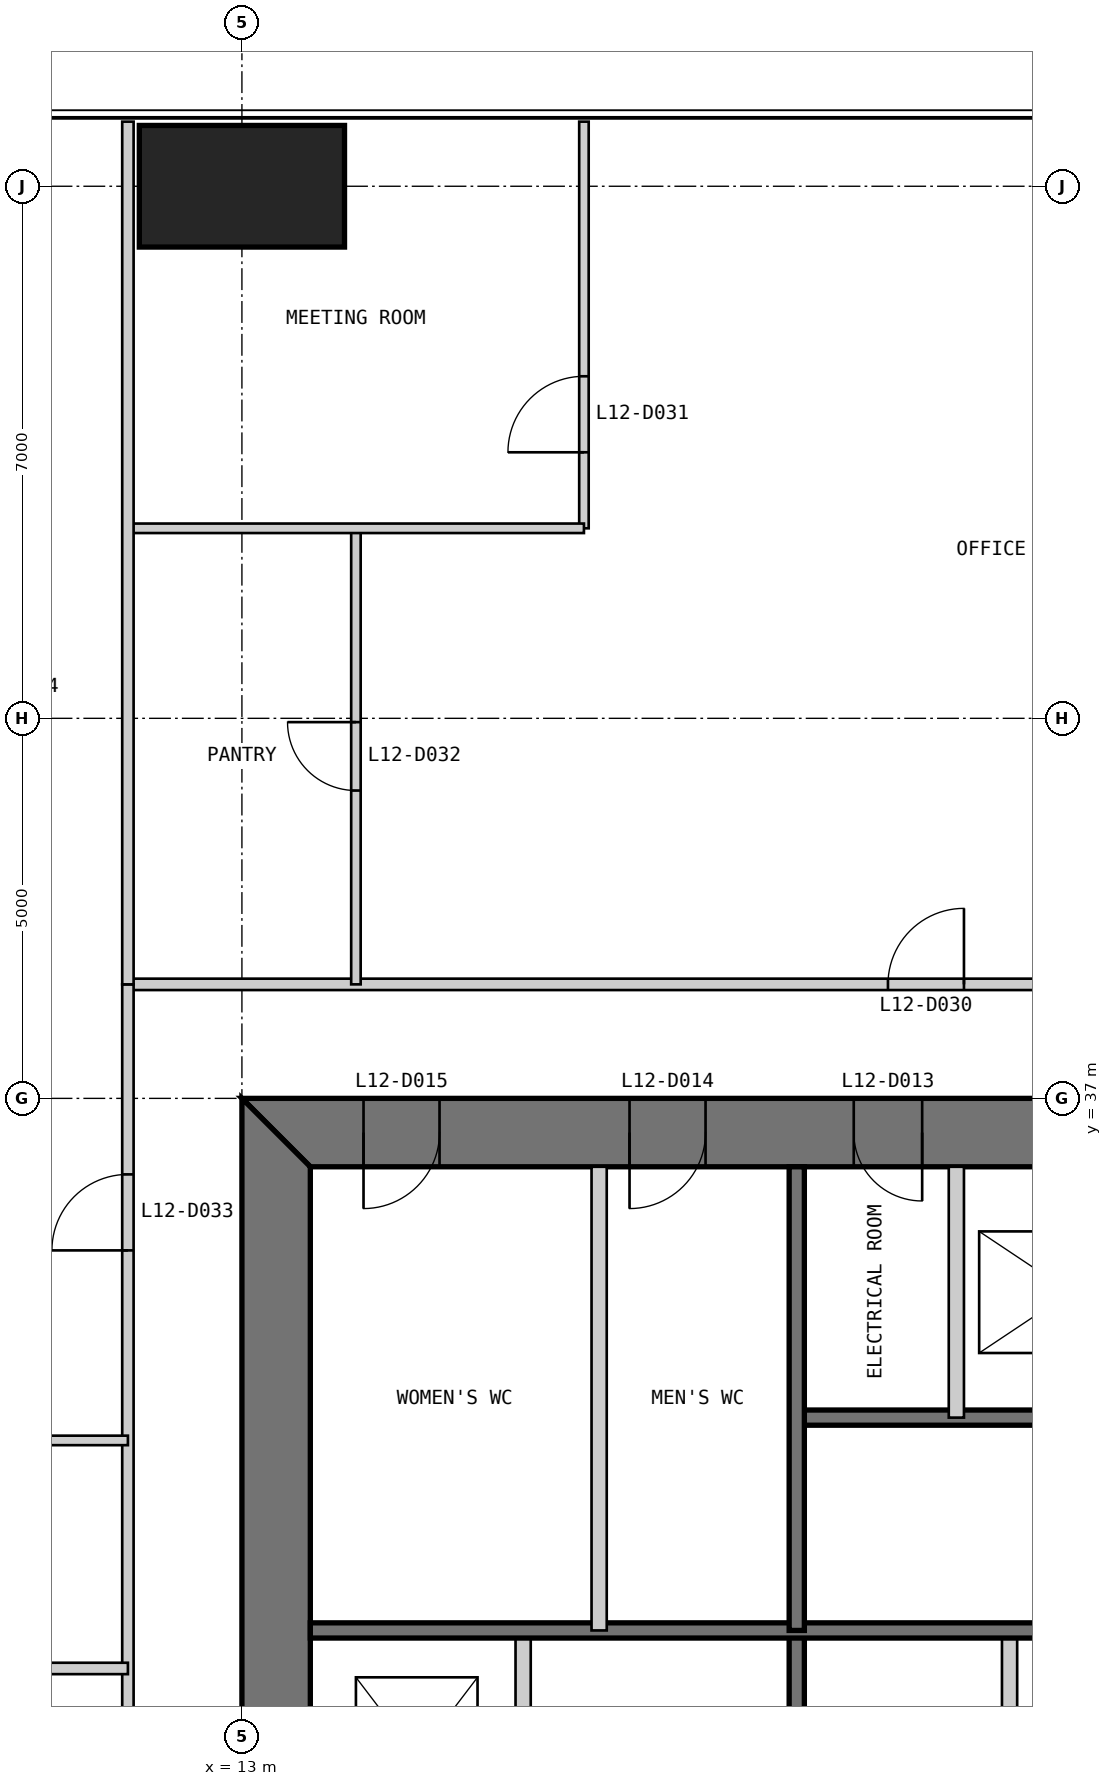
"""IFC4 building model, lengths in metres.
Left out: names, types, materials, properties, quantities, classifications, styles, units other than length and angle.
Written with IfcOpenShell. Run it as: python <this file> out.ifc"""

import sys

from ifc_helpers import new_model, si_unit, direction, frame, frame_2d, origin, origin_2d, place, context, subcontext, project, spatial, polyline, rectangle, outline, extrude, element, fill, save


model = new_model("IFC4")
c1 = context("Model", 3, precision=1e-05, world=origin(), true_north=direction((0.0, 1.0)))
c2 = subcontext(c1, "Body", "Model", "MODEL_VIEW")
j1 = project(units=[si_unit("LENGTHUNIT", "METRE"), si_unit("PLANEANGLEUNIT", "RADIAN")], contexts=[c1])
p1 = place(None, origin())
s1 = spatial("IfcSite", under=j1, at=p1, CompositionType="ELEMENT")
p2 = place(p1, origin())
s2 = spatial("IfcBuilding", under=s1, at=p2, CompositionType="ELEMENT")
p3 = place(p2, frame((0.0, 0.0, 55.0)))
s3 = spatial("IfcBuildingStorey", under=s2, at=p3, CompositionType="ELEMENT", Elevation=55.0)
p4 = place(p3, frame((13.0, 49.0, 0.0), z_axis=(0.0, 0.0, 1.0), x_axis=(1.0, 0.0, 0.0)))
e1 = element("IfcColumn", 1, at=p4, inside=s3, PredefinedType="COLUMN", context=c2, shape_type="SweptSolid", body=[
    extrude(rectangle(XDim=2.7, YDim=1.6, at=origin_2d()), origin(), (0.0, 0.0, 1.0), 4.0),
])
p5 = place(p3, frame((37.0, 36.55, 0.0), z_axis=(0.0, 0.0, 1.0), x_axis=(-1.0, 0.0, 0.0)))
e2 = element("IfcWall", 2, at=p5, inside=s3, PredefinedType="SHEAR", context=c2, shape_type="SweptSolid", body=[
    extrude(outline(polyline([(0.0, -0.45), (24.0, -0.45), (23.1, 0.45), (0.9, 0.45), (0.0, -0.45)])), origin(), (0.0, 0.0, 1.0), 4.0),
])
p6 = place(p5, frame((4.9, 0.0, 0.0)))
e3 = element("IfcOpeningElement", 3, at=p6, cuts=e2, PredefinedType="OPENING", context=c2, shape_type="SweptSolid", body=[
    extrude(rectangle(XDim=1.0, YDim=2.2, at=frame_2d((0.5, 1.1))), frame((0.0, 0.46, 0.0), z_axis=(0.0, -1.0, 0.0), x_axis=(1.0, 0.0, 0.0)), (0.0, 0.0, 1.0), 0.92),
])
p7 = place(p5, frame((8.9, 0.0, 0.0)))
e4 = element("IfcOpeningElement", 4, at=p7, cuts=e2, PredefinedType="OPENING", context=c2, shape_type="SweptSolid", body=[
    extrude(rectangle(XDim=1.1, YDim=2.2, at=frame_2d((0.55, 1.1))), frame((0.0, 0.46, 0.0), z_axis=(0.0, -1.0, 0.0), x_axis=(1.0, 0.0, 0.0)), (0.0, 0.0, 1.0), 0.92),
])
p8 = place(p5, frame((15.05, 0.0, 0.0)))
e5 = element("IfcOpeningElement", 5, at=p8, cuts=e2, PredefinedType="OPENING", context=c2, shape_type="SweptSolid", body=[
    extrude(rectangle(XDim=0.9, YDim=2.2, at=frame_2d((0.45, 1.1))), frame((0.0, 0.46, 0.0), z_axis=(0.0, -1.0, 0.0), x_axis=(1.0, 0.0, 0.0)), (0.0, 0.0, 1.0), 0.92),
])
p9 = place(p5, frame((17.9, 0.0, 0.0)))
e6 = element("IfcOpeningElement", 6, at=p9, cuts=e2, PredefinedType="OPENING", context=c2, shape_type="SweptSolid", body=[
    extrude(rectangle(XDim=1.0, YDim=2.2, at=frame_2d((0.5, 1.1))), frame((0.0, 0.46, 0.0), z_axis=(0.0, -1.0, 0.0), x_axis=(1.0, 0.0, 0.0)), (0.0, 0.0, 1.0), 0.92),
])
p10 = place(p5, frame((21.4, 0.0, 0.0)))
e7 = element("IfcOpeningElement", 7, at=p10, cuts=e2, PredefinedType="OPENING", context=c2, shape_type="SweptSolid", body=[
    extrude(rectangle(XDim=1.0, YDim=2.2, at=frame_2d((0.5, 1.1))), frame((0.0, 0.46, 0.0), z_axis=(0.0, -1.0, 0.0), x_axis=(1.0, 0.0, 0.0)), (0.0, 0.0, 1.0), 0.92),
])
p11 = place(p3, frame((13.45, 36.1, 0.0), z_axis=(0.0, 0.0, 1.0), x_axis=(0.0, -1.0, 0.0)))
e8 = element("IfcWall", 8, at=p11, inside=s3, PredefinedType="SHEAR", context=c2, shape_type="SweptSolid", body=[
    extrude(outline(polyline([(-0.9, -0.45), (23.1, -0.45), (22.2, 0.45), (0.0, 0.45), (-0.9, -0.45)])), origin(), (0.0, 0.0, 1.0), 4.0),
])
p12 = place(p11, frame((20.2, 0.0, 0.0)))
e9 = element("IfcOpeningElement", 9, at=p12, cuts=e8, PredefinedType="OPENING", context=c2, shape_type="SweptSolid", body=[
    extrude(rectangle(XDim=1.0, YDim=2.2, at=frame_2d((0.5, 1.1))), frame((0.0, 0.46, 0.0), z_axis=(0.0, -1.0, 0.0), x_axis=(1.0, 0.0, 0.0)), (0.0, 0.0, 1.0), 0.92),
])
p13 = place(p11, frame((17.25, 0.0, 0.0)))
e10 = element("IfcOpeningElement", 10, at=p13, cuts=e8, PredefinedType="OPENING", context=c2, shape_type="SweptSolid", body=[
    extrude(rectangle(XDim=0.9, YDim=2.2, at=frame_2d((0.45, 1.1))), frame((0.0, 0.46, 0.0), z_axis=(0.0, -1.0, 0.0), x_axis=(1.0, 0.0, 0.0)), (0.0, 0.0, 1.0), 0.92),
])
p14 = place(p3, frame((16.7, 13.9, 0.0), z_axis=(0.0, 0.0, 1.0), x_axis=(0.0, 1.0, 0.0)))
e11 = element("IfcWall", 11, at=p14, inside=s3, PredefinedType="PARTITIONING", context=c2, shape_type="SweptSolid", body=[
    extrude(rectangle(XDim=16.1, YDim=0.2, at=frame_2d((8.05, 0.0))), origin(), (0.0, 0.0, 1.0), 3.8),
])
p15 = place(p14, frame((4.1, 0.0, 0.0)))
e12 = element("IfcOpeningElement", 12, at=p15, cuts=e11, PredefinedType="OPENING", context=c2, shape_type="SweptSolid", body=[
    extrude(rectangle(XDim=0.9, YDim=2.2, at=frame_2d((0.45, 1.1))), frame((0.0, 0.11, 0.0), z_axis=(0.0, -1.0, 0.0), x_axis=(1.0, 0.0, 0.0)), (0.0, 0.0, 1.0), 0.22),
])
p16 = place(p14, frame((7.217, 0.0, 0.0)))
e13 = element("IfcOpeningElement", 13, at=p16, cuts=e11, PredefinedType="OPENING", context=c2, shape_type="SweptSolid", body=[
    extrude(rectangle(XDim=1.1, YDim=2.2, at=frame_2d((0.55, 1.1))), frame((0.0, 0.11, 0.0), z_axis=(0.0, -1.0, 0.0), x_axis=(1.0, 0.0, 0.0)), (0.0, 0.0, 1.0), 0.22),
])
p17 = place(p14, frame((10.55, 0.0, 0.0)))
e14 = element("IfcOpeningElement", 14, at=p17, cuts=e11, PredefinedType="OPENING", context=c2, shape_type="SweptSolid", body=[
    extrude(rectangle(XDim=1.1, YDim=2.2, at=frame_2d((0.55, 1.1))), frame((0.0, 0.11, 0.0), z_axis=(0.0, -1.0, 0.0), x_axis=(1.0, 0.0, 0.0)), (0.0, 0.0, 1.0), 0.22),
])
p18 = place(p14, frame((13.883, 0.0, 0.0)))
e15 = element("IfcOpeningElement", 15, at=p18, cuts=e11, PredefinedType="OPENING", context=c2, shape_type="SweptSolid", body=[
    extrude(rectangle(XDim=1.1, YDim=2.2, at=frame_2d((0.55, 1.1))), frame((0.0, 0.11, 0.0), z_axis=(0.0, -1.0, 0.0), x_axis=(1.0, 0.0, 0.0)), (0.0, 0.0, 1.0), 0.22),
])
p19 = place(p3, frame((20.3, 13.9, 0.0), z_axis=(0.0, 0.0, 1.0), x_axis=(0.0, 1.0, 0.0)))
e16 = element("IfcWall", 16, at=p19, inside=s3, PredefinedType="SOLIDWALL", context=c2, shape_type="SweptSolid", body=[
    extrude(rectangle(XDim=16.1, YDim=0.2, at=frame_2d((8.05, 0.0))), origin(), (0.0, 0.0, 1.0), 3.8),
])
p20 = place(p3, frame((23.1, 20.0, 0.0), z_axis=(0.0, 0.0, 1.0), x_axis=(0.0, 1.0, 0.0)))
e17 = element("IfcWall", 17, at=p20, inside=s3, PredefinedType="PARTITIONING", context=c2, shape_type="SweptSolid", body=[
    extrude(rectangle(XDim=10.0, YDim=0.2, at=frame_2d((5.0, 0.0))), origin(), (0.0, 0.0, 1.0), 3.8),
])
p21 = place(p3, frame((29.7, 32.8, 0.0), z_axis=(0.0, 0.0, 1.0), x_axis=(-1.0, 0.0, 0.0)))
e18 = element("IfcWall", 18, at=p21, inside=s3, PredefinedType="SOLIDWALL", context=c2, shape_type="SweptSolid", body=[
    extrude(rectangle(XDim=9.4, YDim=0.2, at=frame_2d((4.7, 0.0))), origin(), (0.0, 0.0, 1.0), 3.8),
])
p22 = place(p21, frame((0.25, 0.0, 0.0)))
e19 = element("IfcOpeningElement", 19, at=p22, cuts=e18, PredefinedType="OPENING", context=c2, shape_type="SweptSolid", body=[
    extrude(rectangle(XDim=1.0, YDim=2.2, at=frame_2d((0.5, 1.1))), frame((0.0, 0.11, 0.0), z_axis=(0.0, -1.0, 0.0), x_axis=(1.0, 0.0, 0.0)), (0.0, 0.0, 1.0), 0.22),
])
p23 = place(p3, frame((29.7, 30.0, 0.0), z_axis=(0.0, 0.0, 1.0), x_axis=(-1.0, 0.0, 0.0)))
e20 = element("IfcWall", 20, at=p23, inside=s3, PredefinedType="SOLIDWALL", context=c2, shape_type="SweptSolid", body=[
    extrude(rectangle(XDim=15.8, YDim=0.2, at=frame_2d((7.9, 0.0))), origin(), (0.0, 0.0, 1.0), 3.8),
])
p24 = place(p3, frame((22.4, 36.1, 0.0), z_axis=(0.0, 0.0, 1.0), x_axis=(0.0, -1.0, 0.0)))
e21 = element("IfcWall", 21, at=p24, inside=s3, PredefinedType="PARTITIONING", context=c2, shape_type="SweptSolid", body=[
    extrude(rectangle(XDim=3.3, YDim=0.2, at=frame_2d((1.65, 0.0))), origin(), (0.0, 0.0, 1.0), 3.8),
])
p25 = place(p3, frame((20.3, 36.1, 0.0), z_axis=(0.0, 0.0, 1.0), x_axis=(0.0, -1.0, 0.0)))
e22 = element("IfcWall", 22, at=p25, inside=s3, PredefinedType="SOLIDWALL", context=c2, shape_type="SweptSolid", body=[
    extrude(rectangle(XDim=6.1, YDim=0.2, at=frame_2d((3.05, 0.0))), origin(), (0.0, 0.0, 1.0), 3.8),
])
p26 = place(p3, frame((17.7, 36.1, 0.0), z_axis=(0.0, 0.0, 1.0), x_axis=(0.0, -1.0, 0.0)))
e23 = element("IfcWall", 23, at=p26, inside=s3, PredefinedType="PARTITIONING", context=c2, shape_type="SweptSolid", body=[
    extrude(rectangle(XDim=6.1, YDim=0.2, at=frame_2d((3.05, 0.0))), origin(), (0.0, 0.0, 1.0), 3.8),
])
p27 = place(p3, frame((38.5, 38.5, 0.0), z_axis=(0.0, 0.0, 1.0), x_axis=(-1.0, 0.0, 0.0)))
e24 = element("IfcWall", 24, at=p27, inside=s3, PredefinedType="PARTITIONING", context=c2, shape_type="SweptSolid", body=[
    extrude(rectangle(XDim=27.0, YDim=0.15, at=frame_2d((13.5, 0.0))), origin(), (0.0, 0.0, 1.0), 3.85),
])
p28 = place(p27, frame((2.5, 0.0, 0.0)))
e25 = element("IfcOpeningElement", 25, at=p28, cuts=e24, PredefinedType="OPENING", context=c2, shape_type="SweptSolid", body=[
    extrude(rectangle(XDim=1.0, YDim=2.2, at=frame_2d((0.5, 1.1))), frame((0.0, 0.085, 0.0), z_axis=(0.0, -1.0, 0.0), x_axis=(1.0, 0.0, 0.0)), (0.0, 0.0, 1.0), 0.17),
])
p29 = place(p27, frame((16.0, 0.0, 0.0)))
e26 = element("IfcOpeningElement", 26, at=p29, cuts=e24, PredefinedType="OPENING", context=c2, shape_type="SweptSolid", body=[
    extrude(rectangle(XDim=1.0, YDim=2.2, at=frame_2d((0.5, 1.1))), frame((0.0, 0.085, 0.0), z_axis=(0.0, -1.0, 0.0), x_axis=(1.0, 0.0, 0.0)), (0.0, 0.0, 1.0), 0.17),
])
p30 = place(p3, frame((17.5, 49.85, 0.0), z_axis=(0.0, 0.0, 1.0), x_axis=(0.0, -1.0, 0.0)))
e27 = element("IfcWall", 27, at=p30, inside=s3, PredefinedType="PARTITIONING", context=c2, shape_type="SweptSolid", body=[
    extrude(rectangle(XDim=5.35, YDim=0.125, at=frame_2d((2.675, 0.0))), origin(), (0.0, 0.0, 1.0), 3.85),
])
p31 = place(p30, frame((3.35, 0.0, 0.0)))
e28 = element("IfcOpeningElement", 28, at=p31, cuts=e27, PredefinedType="OPENING", context=c2, shape_type="SweptSolid", body=[
    extrude(rectangle(XDim=1.0, YDim=2.2, at=frame_2d((0.5, 1.1))), frame((0.0, 0.073, 0.0), z_axis=(0.0, -1.0, 0.0), x_axis=(1.0, 0.0, 0.0)), (0.0, 0.0, 1.0), 0.145),
])
p32 = place(p3, frame((14.5, 44.5, 0.0), z_axis=(0.0, 0.0, 1.0), x_axis=(0.0, -1.0, 0.0)))
e29 = element("IfcWall", 29, at=p32, inside=s3, PredefinedType="PARTITIONING", context=c2, shape_type="SweptSolid", body=[
    extrude(rectangle(XDim=6.0, YDim=0.125, at=frame_2d((3.0, 0.0))), origin(), (0.0, 0.0, 1.0), 3.85),
])
p33 = place(p32, frame((2.55, 0.0, 0.0)))
e30 = element("IfcOpeningElement", 30, at=p33, cuts=e29, PredefinedType="OPENING", context=c2, shape_type="SweptSolid", body=[
    extrude(rectangle(XDim=0.9, YDim=2.2, at=frame_2d((0.45, 1.1))), frame((0.0, 0.073, 0.0), z_axis=(0.0, -1.0, 0.0), x_axis=(1.0, 0.0, 0.0)), (0.0, 0.0, 1.0), 0.145),
])
p34 = place(p3, frame((17.5, 44.5, 0.0), z_axis=(0.0, 0.0, 1.0), x_axis=(-1.0, 0.0, 0.0)))
e31 = element("IfcWall", 31, at=p34, inside=s3, PredefinedType="PARTITIONING", context=c2, shape_type="SweptSolid", body=[
    extrude(rectangle(XDim=6.0, YDim=0.125, at=frame_2d((3.0, 0.0))), origin(), (0.0, 0.0, 1.0), 3.85),
])
p35 = place(p3, frame((11.5, 38.5, 0.0), z_axis=(0.0, 0.0, 1.0), x_axis=(0.0, -1.0, 0.0)))
e32 = element("IfcWall", 32, at=p35, inside=s3, PredefinedType="PARTITIONING", context=c2, shape_type="SweptSolid", body=[
    extrude(rectangle(XDim=27.0, YDim=0.15, at=frame_2d((13.5, 0.0))), origin(), (0.0, 0.0, 1.0), 3.85),
])
p36 = place(p35, frame((2.5, 0.0, 0.0)))
e33 = element("IfcOpeningElement", 33, at=p36, cuts=e32, PredefinedType="OPENING", context=c2, shape_type="SweptSolid", body=[
    extrude(rectangle(XDim=1.0, YDim=2.2, at=frame_2d((0.5, 1.1))), frame((0.0, 0.085, 0.0), z_axis=(0.0, -1.0, 0.0), x_axis=(1.0, 0.0, 0.0)), (0.0, 0.0, 1.0), 0.17),
])
p37 = place(p35, frame((13.0, 0.0, 0.0)))
e34 = element("IfcOpeningElement", 34, at=p37, cuts=e32, PredefinedType="OPENING", context=c2, shape_type="SweptSolid", body=[
    extrude(rectangle(XDim=1.0, YDim=2.2, at=frame_2d((0.5, 1.1))), frame((0.0, 0.085, 0.0), z_axis=(0.0, -1.0, 0.0), x_axis=(1.0, 0.0, 0.0)), (0.0, 0.0, 1.0), 0.17),
])
p38 = place(p35, frame((23.5, 0.0, 0.0)))
e35 = element("IfcOpeningElement", 35, at=p38, cuts=e32, PredefinedType="OPENING", context=c2, shape_type="SweptSolid", body=[
    extrude(rectangle(XDim=1.0, YDim=2.2, at=frame_2d((0.5, 1.1))), frame((0.0, 0.085, 0.0), z_axis=(0.0, -1.0, 0.0), x_axis=(1.0, 0.0, 0.0)), (0.0, 0.0, 1.0), 0.17),
])
p39 = place(p3, frame((11.5, 49.85, 0.0), z_axis=(0.0, 0.0, 1.0), x_axis=(0.0, -1.0, 0.0)))
e36 = element("IfcWall", 36, at=p39, inside=s3, PredefinedType="PARTITIONING", context=c2, shape_type="SweptSolid", body=[
    extrude(rectangle(XDim=11.35, YDim=0.15, at=frame_2d((5.675, 0.0))), origin(), (0.0, 0.0, 1.0), 3.85),
])
p40 = place(p3, frame((5.5, 32.5, 0.0), z_axis=(0.0, 0.0, 1.0), x_axis=(1.0, 0.0, 0.0)))
e37 = element("IfcWall", 37, at=p40, inside=s3, PredefinedType="PARTITIONING", context=c2, shape_type="SweptSolid", body=[
    extrude(rectangle(XDim=6.0, YDim=0.125, at=frame_2d((3.0, 0.0))), origin(), (0.0, 0.0, 1.0), 3.85),
])
p41 = place(p40, frame((2.55, 0.0, 0.0)))
e38 = element("IfcOpeningElement", 38, at=p41, cuts=e37, PredefinedType="OPENING", context=c2, shape_type="SweptSolid", body=[
    extrude(rectangle(XDim=0.9, YDim=2.2, at=frame_2d((0.45, 1.1))), frame((0.0, 0.073, 0.0), z_axis=(0.0, -1.0, 0.0), x_axis=(1.0, 0.0, 0.0)), (0.0, 0.0, 1.0), 0.145),
])
p42 = place(p3, frame((0.15, 29.5, 0.0), z_axis=(0.0, 0.0, 1.0), x_axis=(1.0, 0.0, 0.0)))
e39 = element("IfcWall", 39, at=p42, inside=s3, PredefinedType="PARTITIONING", context=c2, shape_type="SweptSolid", body=[
    extrude(rectangle(XDim=11.35, YDim=0.15, at=frame_2d((5.675, 0.0))), origin(), (0.0, 0.0, 1.0), 3.85),
])
p43 = place(p8, origin())
e40 = element("IfcDoor", 40, at=p43, inside=s3, OperationType="SINGLE_SWING_LEFT", PredefinedType="DOOR", context=c2, shape_type="SweptSolid", body=[
    extrude(rectangle(XDim=0.9, YDim=2.2, at=frame_2d((0.45, 1.1))), frame((0.0, 0.025, 0.0), z_axis=(0.0, -1.0, 0.0), x_axis=(1.0, 0.0, 0.0)), (0.0, 0.0, 1.0), 0.05),
    extrude(outline(polyline([(0.0, 0.0), (0.04, 0.0), (0.04, 2.16), (0.86, 2.16), (0.86, 0.0), (0.9, 0.0), (0.9, 2.2), (0.0, 2.2), (0.0, 0.0)])), frame((0.0, 0.3, 0.0), z_axis=(0.0, -1.0, 0.0), x_axis=(1.0, 0.0, 0.0)), (0.0, 0.0, 1.0), 0.6),
])
fill(e5, e40)
p44 = place(p9, origin())
e41 = element("IfcDoor", 41, at=p44, inside=s3, OperationType="SINGLE_SWING_RIGHT", PredefinedType="DOOR", context=c2, shape_type="SweptSolid", body=[
    extrude(rectangle(XDim=1.0, YDim=2.2, at=frame_2d((0.5, 1.1))), frame((0.0, 0.025, 0.0), z_axis=(0.0, -1.0, 0.0), x_axis=(1.0, 0.0, 0.0)), (0.0, 0.0, 1.0), 0.05),
    extrude(outline(polyline([(0.0, 0.0), (0.04, 0.0), (0.04, 2.16), (0.96, 2.16), (0.96, 0.0), (1.0, 0.0), (1.0, 2.2), (0.0, 2.2), (0.0, 0.0)])), frame((0.0, 0.3, 0.0), z_axis=(0.0, -1.0, 0.0), x_axis=(1.0, 0.0, 0.0)), (0.0, 0.0, 1.0), 0.6),
])
fill(e6, e41)
p45 = place(p10, origin())
e42 = element("IfcDoor", 42, at=p45, inside=s3, OperationType="SINGLE_SWING_RIGHT", PredefinedType="DOOR", context=c2, shape_type="SweptSolid", body=[
    extrude(rectangle(XDim=1.0, YDim=2.2, at=frame_2d((0.5, 1.1))), frame((0.0, 0.025, 0.0), z_axis=(0.0, -1.0, 0.0), x_axis=(1.0, 0.0, 0.0)), (0.0, 0.0, 1.0), 0.05),
    extrude(outline(polyline([(0.0, 0.0), (0.04, 0.0), (0.04, 2.16), (0.96, 2.16), (0.96, 0.0), (1.0, 0.0), (1.0, 2.2), (0.0, 2.2), (0.0, 0.0)])), frame((0.0, 0.3, 0.0), z_axis=(0.0, -1.0, 0.0), x_axis=(1.0, 0.0, 0.0)), (0.0, 0.0, 1.0), 0.6),
])
fill(e7, e42)
p46 = place(p29, frame((1.0, 0.0, 0.0), z_axis=(0.0, 0.0, 1.0), x_axis=(-1.0, 0.0, 0.0)))
e43 = element("IfcDoor", 43, at=p46, inside=s3, OperationType="SINGLE_SWING_RIGHT", PredefinedType="DOOR", context=c2, shape_type="SweptSolid", body=[
    extrude(rectangle(XDim=1.0, YDim=2.2, at=frame_2d((0.5, 1.1))), frame((0.0, 0.025, 0.0), z_axis=(0.0, -1.0, 0.0), x_axis=(1.0, 0.0, 0.0)), (0.0, 0.0, 1.0), 0.05),
])
fill(e26, e43)
p47 = place(p31, frame((1.0, 0.0, 0.0), z_axis=(0.0, 0.0, 1.0), x_axis=(-1.0, 0.0, 0.0)))
e44 = element("IfcDoor", 44, at=p47, inside=s3, OperationType="SINGLE_SWING_LEFT", PredefinedType="DOOR", context=c2, shape_type="SweptSolid", body=[
    extrude(rectangle(XDim=1.0, YDim=2.2, at=frame_2d((0.5, 1.1))), frame((0.0, 0.025, 0.0), z_axis=(0.0, -1.0, 0.0), x_axis=(1.0, 0.0, 0.0)), (0.0, 0.0, 1.0), 0.05),
])
fill(e28, e44)
p48 = place(p33, frame((0.9, 0.0, 0.0), z_axis=(0.0, 0.0, 1.0), x_axis=(-1.0, 0.0, 0.0)))
e45 = element("IfcDoor", 45, at=p48, inside=s3, OperationType="SINGLE_SWING_RIGHT", PredefinedType="DOOR", context=c2, shape_type="SweptSolid", body=[
    extrude(rectangle(XDim=0.9, YDim=2.2, at=frame_2d((0.45, 1.1))), frame((0.0, 0.025, 0.0), z_axis=(0.0, -1.0, 0.0), x_axis=(1.0, 0.0, 0.0)), (0.0, 0.0, 1.0), 0.05),
])
fill(e30, e45)
p49 = place(p36, frame((1.0, 0.0, 0.0), z_axis=(0.0, 0.0, 1.0), x_axis=(-1.0, 0.0, 0.0)))
e46 = element("IfcDoor", 46, at=p49, inside=s3, OperationType="SINGLE_SWING_LEFT", PredefinedType="DOOR", context=c2, shape_type="SweptSolid", body=[
    extrude(rectangle(XDim=1.0, YDim=2.2, at=frame_2d((0.5, 1.1))), frame((0.0, 0.025, 0.0), z_axis=(0.0, -1.0, 0.0), x_axis=(1.0, 0.0, 0.0)), (0.0, 0.0, 1.0), 0.05),
])
fill(e33, e46)
save(model, sys.argv[1])
